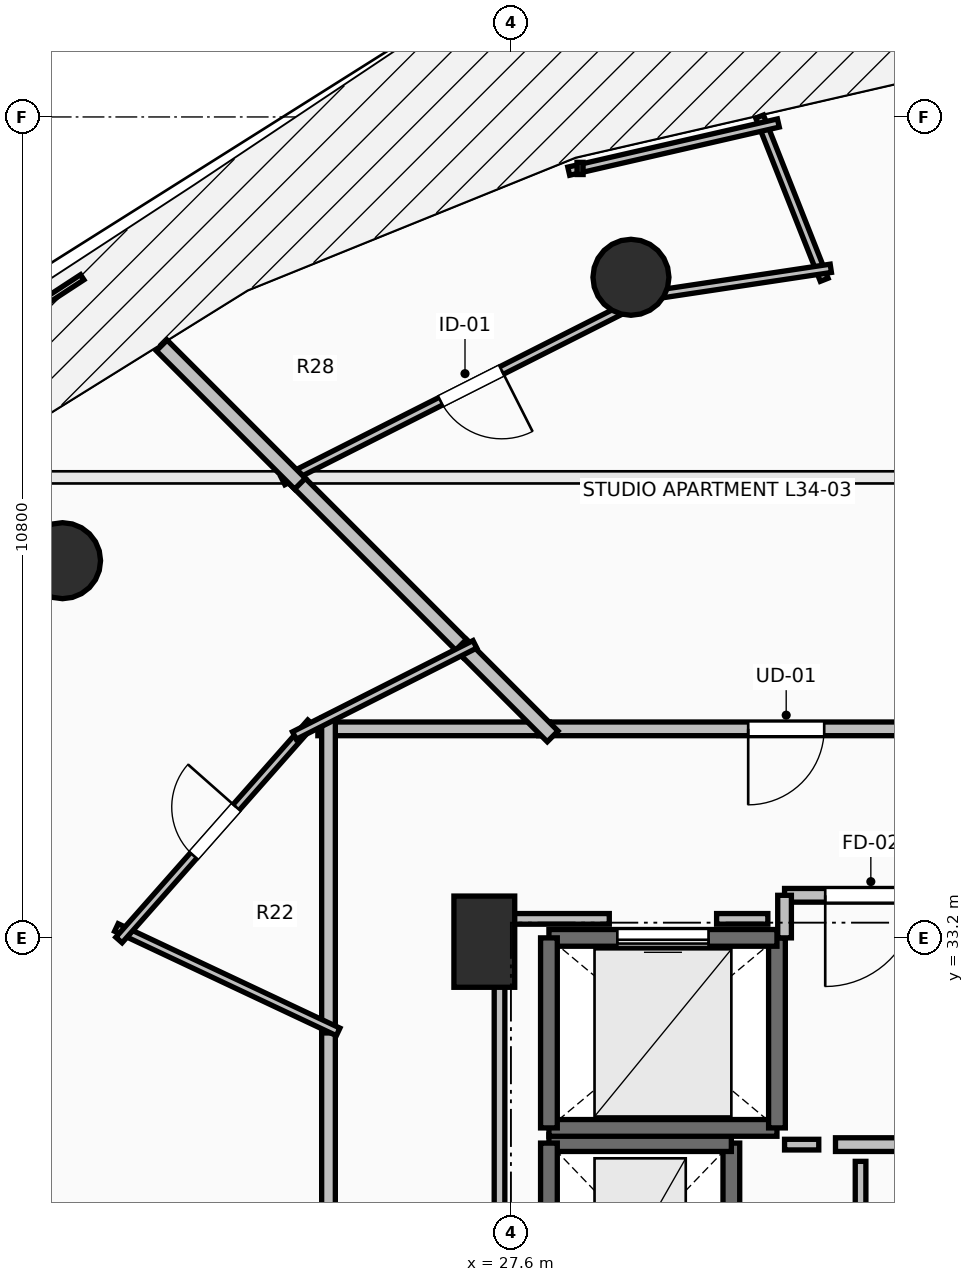
"""IFC4 building model, lengths in metres.
Left out: names, types, materials, properties, quantities, classifications, styles, units other than length and angle.
Written with IfcOpenShell. Run it as: python <this file> out.ifc"""

import sys

from ifc_helpers import new_model, si_unit, direction, frame, frame_2d, origin, origin_2d, place, context, subcontext, project, spatial, rectangle, circle, extrude, element, fill, save


model = new_model("IFC4")
c1 = context("Model", 3, precision=1e-05, world=origin(), true_north=direction((0.0, 1.0)))
c2 = subcontext(c1, "Body", "Model", "MODEL_VIEW")
j1 = project(units=[si_unit("LENGTHUNIT", "METRE"), si_unit("PLANEANGLEUNIT", "RADIAN")], contexts=[c1])
p1 = place(None, origin())
s1 = spatial("IfcSite", under=j1, at=p1, CompositionType="ELEMENT")
p2 = place(p1, origin())
s2 = spatial("IfcBuilding", under=s1, at=p2, CompositionType="ELEMENT")
p3 = place(p2, frame((0.0, 0.0, 129.1)))
s3 = spatial("IfcBuildingStorey", under=s2, at=p3, CompositionType="ELEMENT", Elevation=129.1)
for number, where, z_axis, x_axis in (
    (1, (29.179, 41.891, 0.0), (0.0, 0.0, 1.0), (-0.383, 0.924, 0.0)),
    (2, (21.701, 38.162, 0.0), (0.0, 0.0, 1.0), (-0.707, 0.707, 0.0)),
):
    element("IfcColumn", number, at=place(p3, frame(where, z_axis=z_axis, x_axis=x_axis)), inside=s3, PredefinedType="COLUMN", context=c2, shape_type="SweptSolid", body=[
        extrude(circle(Radius=0.5, at=origin_2d()), origin(), (0.0, 0.0, 1.0), 3.5),
    ])
p4 = place(p3, frame((27.25, 33.15, 0.0), z_axis=(0.0, 0.0, 1.0), x_axis=(1.0, 0.0, 0.0)))
e3 = element("IfcColumn", 3, at=p4, inside=s3, PredefinedType="PILASTER", context=c2, shape_type="SweptSolid", body=[
    extrude(rectangle(XDim=0.8, YDim=1.2, at=origin_2d()), origin(), (0.0, 0.0, 1.0), 3.5),
])
p5 = place(p3, frame((30.5, 28.0, 0.0), z_axis=(0.0, 0.0, 1.0), x_axis=(0.0, 1.0, 0.0)))
e4 = element("IfcWall", 4, at=p5, inside=s3, PredefinedType="SHEAR", context=c2, shape_type="SweptSolid", body=[
    extrude(rectangle(XDim=2.5, YDim=0.22, at=frame_2d((1.25, 0.0))), origin(), (0.0, 0.0, 1.0), 3.24),
])
p6 = place(p3, frame((30.5, 30.5, 0.0), z_axis=(0.0, 0.0, 1.0), x_axis=(-1.0, 0.0, 0.0)))
e5 = element("IfcWall", 5, at=p6, inside=s3, PredefinedType="SHEAR", context=c2, shape_type="SweptSolid", body=[
    extrude(rectangle(XDim=2.4, YDim=0.22, at=frame_2d((1.2, 0.0))), origin(), (0.0, 0.0, 1.0), 3.24),
])
p7 = place(p3, frame((28.1, 30.5, 0.0), z_axis=(0.0, 0.0, 1.0), x_axis=(0.0, -1.0, 0.0)))
e6 = element("IfcWall", 6, at=p7, inside=s3, PredefinedType="SHEAR", context=c2, shape_type="SweptSolid", body=[
    extrude(rectangle(XDim=2.5, YDim=0.22, at=frame_2d((1.25, 0.0))), origin(), (0.0, 0.0, 1.0), 3.24),
])
p8 = place(p3, frame((28.1, 30.7, 0.0), z_axis=(0.0, 0.0, 1.0), x_axis=(1.0, 0.0, 0.0)))
e7 = element("IfcWall", 7, at=p8, inside=s3, PredefinedType="SOLIDWALL", context=c2, shape_type="SweptSolid", body=[
    extrude(rectangle(XDim=3.0, YDim=0.22, at=frame_2d((1.5, 0.0))), origin(), (0.0, 0.0, 1.0), 3.24),
])
p9 = place(p3, frame((31.1, 30.7, 0.0), z_axis=(0.0, 0.0, 1.0), x_axis=(0.0, 1.0, 0.0)))
e8 = element("IfcWall", 8, at=p9, inside=s3, PredefinedType="SOLIDWALL", context=c2, shape_type="SweptSolid", body=[
    extrude(rectangle(XDim=2.5, YDim=0.22, at=frame_2d((1.25, 0.0))), origin(), (0.0, 0.0, 1.0), 3.24),
])
p10 = place(p3, frame((31.1, 33.2, 0.0), z_axis=(0.0, 0.0, 1.0), x_axis=(-1.0, 0.0, 0.0)))
e9 = element("IfcWall", 9, at=p10, inside=s3, PredefinedType="SOLIDWALL", context=c2, shape_type="SweptSolid", body=[
    extrude(rectangle(XDim=3.0, YDim=0.22, at=frame_2d((1.5, 0.0))), origin(), (0.0, 0.0, 1.0), 3.24),
])
p11 = place(p10, frame((0.9, 0.0, 0.0)))
e10 = element("IfcOpeningElement", 10, at=p11, cuts=e9, PredefinedType="OPENING", context=c2, shape_type="SweptSolid", body=[
    extrude(rectangle(XDim=1.2, YDim=2.2, at=frame_2d((0.6, 1.1))), frame((0.0, 0.125, 0.0), z_axis=(0.0, -1.0, 0.0), x_axis=(1.0, 0.0, 0.0)), (0.0, 0.0, 1.0), 0.25),
])
p12 = place(p3, frame((28.1, 33.2, 0.0), z_axis=(0.0, 0.0, 1.0), x_axis=(0.0, -1.0, 0.0)))
e11 = element("IfcWall", 11, at=p12, inside=s3, PredefinedType="SOLIDWALL", context=c2, shape_type="SweptSolid", body=[
    extrude(rectangle(XDim=2.5, YDim=0.22, at=frame_2d((1.25, 0.0))), origin(), (0.0, 0.0, 1.0), 3.24),
])
p13 = place(p3, frame((31.87, 30.48, 0.0), z_axis=(0.0, 0.0, 1.0), x_axis=(1.0, 0.0, 0.0)))
e12 = element("IfcWall", 12, at=p13, inside=s3, PredefinedType="PARTITIONING", context=c2, shape_type="SweptSolid", body=[
    extrude(rectangle(XDim=1.6, YDim=0.18, at=frame_2d((0.8, 0.0))), origin(), (0.0, 0.0, 1.0), 3.24),
])
p14 = place(p3, frame((33.47, 33.76, 0.0), z_axis=(0.0, 0.0, 1.0), x_axis=(-1.0, 0.0, 0.0)))
e13 = element("IfcWall", 13, at=p14, inside=s3, PredefinedType="PARTITIONING", context=c2, shape_type="SweptSolid", body=[
    extrude(rectangle(XDim=2.27, YDim=0.18, at=frame_2d((1.135, 0.0))), origin(), (0.0, 0.0, 1.0), 3.24),
])
p15 = place(p14, frame((0.535, 0.0, 0.0)))
e14 = element("IfcOpeningElement", 14, at=p15, cuts=e13, PredefinedType="OPENING", context=c2, shape_type="SweptSolid", body=[
    extrude(rectangle(XDim=1.2, YDim=2.15, at=frame_2d((0.6, 1.075))), frame((0.0, 0.105, 0.0), z_axis=(0.0, -1.0, 0.0), x_axis=(1.0, 0.0, 0.0)), (0.0, 0.0, 1.0), 0.21),
])
p16 = place(p3, frame((31.2, 33.76, 0.0), z_axis=(0.0, 0.0, 1.0), x_axis=(0.0, -1.0, 0.0)))
e15 = element("IfcWall", 15, at=p16, inside=s3, PredefinedType="PARTITIONING", context=c2, shape_type="SweptSolid", body=[
    extrude(rectangle(XDim=0.56, YDim=0.18, at=frame_2d((0.28, 0.0))), origin(), (0.0, 0.0, 1.0), 3.24),
])
p17 = place(p3, frame((34.478, 35.95, 0.0), z_axis=(0.0, 0.0, 1.0), x_axis=(-1.0, 0.0, 0.0)))
e16 = element("IfcWall", 16, at=p17, inside=s3, PredefinedType="PARTITIONING", context=c2, shape_type="SweptSolid", body=[
    extrude(rectangle(XDim=6.513, YDim=0.18, at=frame_2d((3.256, 0.0))), origin(), (0.0, 0.0, 1.0), 2.432),
])
p18 = place(p17, frame((2.757, 0.0, 0.0)))
e17 = element("IfcOpeningElement", 17, at=p18, cuts=e16, PredefinedType="OPENING", context=c2, shape_type="SweptSolid", body=[
    extrude(rectangle(XDim=1.0, YDim=2.15, at=frame_2d((0.5, 1.075))), frame((0.0, 0.105, 0.0), z_axis=(0.0, -1.0, 0.0), x_axis=(1.0, 0.0, 0.0)), (0.0, 0.0, 1.0), 0.21),
])
p19 = place(p3, frame((25.2, 32.089, 0.0), z_axis=(0.0, 0.0, 1.0), x_axis=(0.0, -1.0, 0.0)))
e18 = element("IfcWall", 18, at=p19, inside=s3, PredefinedType="PARTITIONING", context=c2, shape_type="SweptSolid", body=[
    extrude(rectangle(XDim=4.839, YDim=0.18, at=frame_2d((2.419, 0.0))), origin(), (0.0, 0.0, 1.0), 2.432),
])
p20 = place(p3, frame((28.105, 35.95, 0.0), z_axis=(0.0, 0.0, 1.0), x_axis=(-1.0, 0.0, 0.0)))
e19 = element("IfcWall", 19, at=p20, inside=s3, PredefinedType="PARTITIONING", context=c2, shape_type="SweptSolid", body=[
    extrude(rectangle(XDim=3.045, YDim=0.18, at=frame_2d((1.522, 0.0))), origin(), (0.0, 0.0, 1.0), 2.432),
])
p21 = place(p3, frame((25.2, 36.09, 0.0), z_axis=(0.0, 0.0, 1.0), x_axis=(0.0, -1.0, 0.0)))
e20 = element("IfcWall", 20, at=p21, inside=s3, PredefinedType="PARTITIONING", context=c2, shape_type="SweptSolid", body=[
    extrude(rectangle(XDim=4.141, YDim=0.18, at=frame_2d((2.071, 0.0))), origin(), (0.0, 0.0, 1.0), 2.432),
])
p22 = place(p3, frame((30.872, 44.005, 0.0), z_axis=(0.0, 0.0, 1.0), x_axis=(0.368016079814, -0.929819426017, 0.0)))
e21 = element("IfcWall", 21, at=p22, inside=s3, PredefinedType="PARTITIONING", context=c2, shape_type="SweptSolid", body=[
    extrude(rectangle(XDim=2.309, YDim=0.11, at=frame_2d((1.155, 0.0))), origin(), (0.0, 0.0, 1.0), 2.728),
])
p23 = place(p3, frame((31.808, 42.009, 0.0), z_axis=(0.0, 0.0, 1.0), x_axis=(-0.988887788943, -0.148663851958, 0.0)))
e22 = element("IfcWall", 22, at=p23, inside=s3, PredefinedType="PARTITIONING", context=c2, shape_type="SweptSolid", body=[
    extrude(rectangle(XDim=2.547, YDim=0.11, at=frame_2d((1.273, 0.0))), origin(), (0.0, 0.0, 1.0), 3.24),
])
p24 = place(p3, frame((29.553, 41.714, 0.0), z_axis=(0.0, 0.0, 1.0), x_axis=(-0.892438454993, -0.451169152369, 0.0)))
e23 = element("IfcWall", 23, at=p24, inside=s3, PredefinedType="PARTITIONING", context=c2, shape_type="SweptSolid", body=[
    extrude(rectangle(XDim=5.549, YDim=0.11, at=frame_2d((2.774, 0.0))), origin(), (0.0, 0.0, 1.0), 2.432),
])
p25 = place(p24, frame((2.324, 0.0, 0.0)))
e24 = element("IfcOpeningElement", 24, at=p25, cuts=e23, PredefinedType="OPENING", context=c2, shape_type="SweptSolid", body=[
    extrude(rectangle(XDim=0.9, YDim=2.1, at=frame_2d((0.45, 1.05))), frame((0.0, 0.07, 0.0), z_axis=(0.0, -1.0, 0.0), x_axis=(1.0, 0.0, 0.0)), (0.0, 0.0, 1.0), 0.14),
])
p26 = place(p3, frame((31.118, 43.92, 0.0), z_axis=(0.0, 0.0, 1.0), x_axis=(-0.974594373263, -0.223977247963, 0.0)))
e25 = element("IfcWall", 25, at=p26, inside=s3, PredefinedType="PARTITIONING", context=c2, shape_type="SweptSolid", body=[
    extrude(rectangle(XDim=2.83, YDim=0.11, at=frame_2d((1.415, 0.0))), origin(), (0.0, 0.0, 1.0), 3.24),
])
p27 = place(p3, frame((24.726, 39.274, 0.0), z_axis=(0.0, 0.0, 1.0), x_axis=(0.707106781187, -0.707106781187, 0.0)))
e26 = element("IfcWall", 26, at=p27, inside=s3, PredefinedType="PARTITIONING", context=c2, shape_type="SweptSolid", body=[
    extrude(rectangle(XDim=3.277, YDim=0.2, at=frame_2d((1.638, 0.0))), origin(), (0.0, 0.0, 1.0), 2.874),
])
p28 = place(p3, frame((26.944, 37.056, 0.0), z_axis=(0.0, 0.0, 1.0), x_axis=(0.707106781187, -0.707106781187, 0.0)))
e27 = element("IfcWall", 27, at=p28, inside=s3, PredefinedType="PARTITIONING", context=c2, shape_type="SweptSolid", body=[
    extrude(rectangle(XDim=1.704, YDim=0.2, at=frame_2d((0.852, 0.0))), origin(), (0.0, 0.0, 1.0), 2.432),
])
p29 = place(p3, frame((23.006, 40.994, 0.0), z_axis=(0.0, 0.0, 1.0), x_axis=(0.707106781187, -0.707106781187, 0.0)))
e28 = element("IfcWall", 28, at=p29, inside=s3, PredefinedType="PARTITIONING", context=c2, shape_type="SweptSolid", body=[
    extrude(rectangle(XDim=2.572, YDim=0.2, at=frame_2d((1.286, 0.0))), origin(), (0.0, 0.0, 1.0), 2.728),
])
p30 = place(p3, frame((25.327, 31.963, 0.0), z_axis=(0.0, 0.0, 1.0), x_axis=(-0.904775800467, 0.425888190596, 0.0)))
e29 = element("IfcWall", 29, at=p30, inside=s3, PredefinedType="PARTITIONING", context=c2, shape_type="SweptSolid", body=[
    extrude(rectangle(XDim=3.225, YDim=0.11, at=frame_2d((1.612, 0.0))), origin(), (0.0, 0.0, 1.0), 2.922),
])
p31 = place(p3, frame((22.443, 33.172, 0.0), z_axis=(0.0, 0.0, 1.0), x_axis=(0.662199468358, 0.749327607997, 0.0)))
e30 = element("IfcWall", 30, at=p31, inside=s3, PredefinedType="PARTITIONING", context=c2, shape_type="SweptSolid", body=[
    extrude(rectangle(XDim=3.814, YDim=0.11, at=frame_2d((1.907, 0.0))), origin(), (0.0, 0.0, 1.0), 2.432),
])
p32 = place(p31, frame((1.482, 0.0, 0.0)))
e31 = element("IfcOpeningElement", 31, at=p32, cuts=e30, PredefinedType="OPENING", context=c2, shape_type="SweptSolid", body=[
    extrude(rectangle(XDim=0.85, YDim=2.1, at=frame_2d((0.425, 1.05))), frame((0.0, 0.07, 0.0), z_axis=(0.0, -1.0, 0.0), x_axis=(1.0, 0.0, 0.0)), (0.0, 0.0, 1.0), 0.14),
])
p33 = place(p3, frame((24.751, 35.862, 0.0), z_axis=(0.0, 0.0, 1.0), x_axis=(0.892455114256, 0.451136197882, 0.0)))
e32 = element("IfcWall", 32, at=p33, inside=s3, PredefinedType="PARTITIONING", context=c2, shape_type="SweptSolid", body=[
    extrude(rectangle(XDim=2.661, YDim=0.11, at=frame_2d((1.331, 0.0))), origin(), (0.0, 0.0, 1.0), 3.24),
])
p34 = place(p3, frame((31.2, 30.48, 0.0), z_axis=(0.0, 0.0, 1.0), x_axis=(1.0, 0.0, 0.0)))
e33 = element("IfcWall", 33, at=p34, inside=s3, PredefinedType="PARTITIONING", context=c2, shape_type="SweptSolid", body=[
    extrude(rectangle(XDim=0.45, YDim=0.14, at=frame_2d((0.225, 0.0))), origin(), (0.0, 0.0, 1.0), 3.24),
])
p35 = place(p3, frame((32.2, 30.26, 0.0), z_axis=(0.0, 0.0, 1.0), x_axis=(0.0, -1.0, 0.0)))
e34 = element("IfcWall", 34, at=p35, inside=s3, PredefinedType="PARTITIONING", context=c2, shape_type="SweptSolid", body=[
    extrude(rectangle(XDim=2.39, YDim=0.14, at=frame_2d((1.195, 0.0))), origin(), (0.0, 0.0, 1.0), 3.24),
])
p36 = place(p3, frame((30.98, 33.45, 0.0), z_axis=(0.0, 0.0, 1.0), x_axis=(-1.0, 0.0, 0.0)))
e35 = element("IfcWall", 35, at=p36, inside=s3, PredefinedType="PARTITIONING", context=c2, shape_type="SweptSolid", body=[
    extrude(rectangle(XDim=0.674, YDim=0.14, at=frame_2d((0.337, 0.0))), origin(), (0.0, 0.0, 1.0), 3.24),
])
p37 = place(p3, frame((28.894, 33.45, 0.0), z_axis=(0.0, 0.0, 1.0), x_axis=(-1.0, 0.0, 0.0)))
e36 = element("IfcWall", 36, at=p37, inside=s3, PredefinedType="PARTITIONING", context=c2, shape_type="SweptSolid", body=[
    extrude(rectangle(XDim=1.444, YDim=0.14, at=frame_2d((0.722, 0.0))), origin(), (0.0, 0.0, 1.0), 2.432),
])
p38 = place(p3, frame((27.45, 33.45, 0.0), z_axis=(0.0, 0.0, 1.0), x_axis=(0.0, -1.0, 0.0)))
e37 = element("IfcWall", 37, at=p38, inside=s3, PredefinedType="PARTITIONING", context=c2, shape_type="SweptSolid", body=[
    extrude(rectangle(XDim=5.254, YDim=0.14, at=frame_2d((2.627, 0.0))), origin(), (0.0, 0.0, 1.0), 2.432),
])
p39 = place(p11, origin())
e38 = element("IfcDoor", 38, at=p39, inside=s3, OperationType="SLIDING_TO_LEFT", PredefinedType="DOOR", context=c2, shape_type="SweptSolid", body=[
    extrude(rectangle(XDim=1.2, YDim=2.2, at=frame_2d((0.6, 1.1))), frame((0.0, 0.025, 0.0), z_axis=(0.0, -1.0, 0.0), x_axis=(1.0, 0.0, 0.0)), (0.0, 0.0, 1.0), 0.05),
])
fill(e10, e38)
p40 = place(p15, origin())
e39 = element("IfcDoor", 39, at=p40, inside=s3, OperationType="SINGLE_SWING_RIGHT", PredefinedType="DOOR", context=c2, shape_type="SweptSolid", body=[
    extrude(rectangle(XDim=1.2, YDim=2.15, at=frame_2d((0.6, 1.075))), frame((0.0, 0.025, 0.0), z_axis=(0.0, -1.0, 0.0), x_axis=(1.0, 0.0, 0.0)), (0.0, 0.0, 1.0), 0.05),
])
fill(e14, e39)
p41 = place(p18, origin())
e40 = element("IfcDoor", 40, at=p41, inside=s3, OperationType="SINGLE_SWING_RIGHT", PredefinedType="DOOR", context=c2, shape_type="SweptSolid", body=[
    extrude(rectangle(XDim=1.0, YDim=2.15, at=frame_2d((0.5, 1.075))), frame((0.0, 0.025, 0.0), z_axis=(0.0, -1.0, 0.0), x_axis=(1.0, 0.0, 0.0)), (0.0, 0.0, 1.0), 0.05),
])
fill(e17, e40)
p42 = place(p25, origin())
e41 = element("IfcDoor", 41, at=p42, inside=s3, OperationType="SINGLE_SWING_LEFT", PredefinedType="DOOR", context=c2, shape_type="SweptSolid", body=[
    extrude(rectangle(XDim=0.9, YDim=2.1, at=frame_2d((0.45, 1.05))), frame((0.0, 0.025, 0.0), z_axis=(0.0, -1.0, 0.0), x_axis=(1.0, 0.0, 0.0)), (0.0, 0.0, 1.0), 0.05),
])
fill(e24, e41)
p43 = place(p32, origin())
e42 = element("IfcDoor", 42, at=p43, inside=s3, OperationType="SINGLE_SWING_RIGHT", PredefinedType="DOOR", context=c2, shape_type="SweptSolid", body=[
    extrude(rectangle(XDim=0.85, YDim=2.1, at=frame_2d((0.425, 1.05))), frame((0.0, 0.025, 0.0), z_axis=(0.0, -1.0, 0.0), x_axis=(1.0, 0.0, 0.0)), (0.0, 0.0, 1.0), 0.05),
])
fill(e31, e42)
save(model, sys.argv[1])
